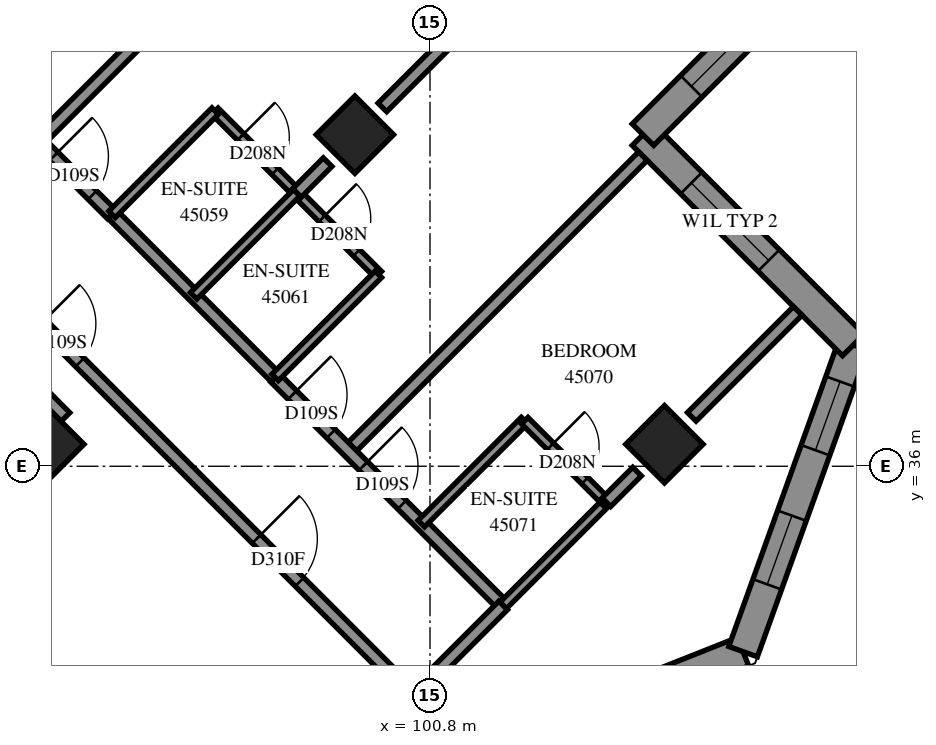
"""IFC4 building model, lengths in metres.
Left out: names, types, materials, properties, quantities, classifications, styles, units other than length and angle.
Written with IfcOpenShell. Run it as: python <this file> out.ifc"""

import sys

from ifc_helpers import new_model, si_unit, direction, frame, frame_2d, origin, origin_2d, place, context, subcontext, project, spatial, polyline, rectangle, outline, extrude, element, fill, save


model = new_model("IFC4")
c1 = context("Model", 3, precision=1e-05, world=origin(), true_north=direction((0.0, 1.0)))
c2 = subcontext(c1, "Body", "Model", "MODEL_VIEW")
j1 = project(units=[si_unit("LENGTHUNIT", "METRE"), si_unit("PLANEANGLEUNIT", "RADIAN")], contexts=[c1])
p1 = place(None, origin())
s1 = spatial("IfcSite", under=j1, at=p1, CompositionType="ELEMENT")
p2 = place(p1, origin())
s2 = spatial("IfcBuilding", under=s1, at=p2, CompositionType="ELEMENT")
p3 = place(p2, frame((0.0, 0.0, 166.0)))
s3 = spatial("IfcBuildingStorey", under=s2, at=p3, CompositionType="ELEMENT", Elevation=166.0)
for number, where, z_axis, x_axis in (
    (1, (99.565, 41.453, 0.0), (0.0, 0.0, 1.0), (0.707, -0.707, 0.0)),
    (2, (94.474, 36.362, 0.0), (0.0, 0.0, 1.0), (0.707, -0.707, 0.0)),
    (3, (104.656, 36.362, 0.0), (0.0, 0.0, 1.0), (0.707, -0.707, 0.0)),
):
    element("IfcColumn", number, at=place(p3, frame(where, z_axis=z_axis, x_axis=x_axis)), inside=s3, PredefinedType="COLUMN", context=c2, shape_type="SweptSolid", body=[
        extrude(rectangle(XDim=0.9, YDim=0.9, at=origin_2d()), origin(), (0.0, 0.0, 1.0), 3.1),
    ])
p4 = place(p3, frame((87.049, 38.695, -0.3), z_axis=(0.0, 0.0, 1.0), x_axis=(0.7071067812, 0.7071067812, 0.0)))
e4 = element("IfcWall", 4, at=p4, inside=s3, PredefinedType="SHEAR", context=c2, shape_type="SweptSolid", body=[
    extrude(rectangle(XDim=14.4, YDim=0.6, at=frame_2d((7.2, 0.0))), origin(), (0.0, 0.0, 1.0), 2.7),
])
p5 = place(p4, frame((4.55, 0.0, 0.3)))
e5 = element("IfcOpeningElement", 5, at=p5, cuts=e4, PredefinedType="OPENING", context=c2, shape_type="SweptSolid", body=[
    extrude(rectangle(XDim=1.1, YDim=2.1, at=frame_2d((0.55, 1.05))), frame((0.0, 0.31, 0.0), z_axis=(0.0, -1.0, 0.0), x_axis=(1.0, 0.0, 0.0)), (0.0, 0.0, 1.0), 0.62),
])
p6 = place(p4, frame((11.35, 0.0, 0.3)))
e6 = element("IfcOpeningElement", 6, at=p6, cuts=e4, PredefinedType="OPENING", context=c2, shape_type="SweptSolid", body=[
    extrude(rectangle(XDim=1.1, YDim=2.1, at=frame_2d((0.55, 1.05))), frame((0.0, 0.31, 0.0), z_axis=(0.0, -1.0, 0.0), x_axis=(1.0, 0.0, 0.0)), (0.0, 0.0, 1.0), 0.62),
])
p7 = place(p3, frame((100.796, 30.907, 0.0), z_axis=(0.0, 0.0, 1.0), x_axis=(0.9295366495, 0.3687297347, 0.0)))
e7 = element("IfcWall", 7, at=p7, inside=s3, PredefinedType="SOLIDWALL", context=c2, shape_type="SweptSolid", body=[
    extrude(outline(polyline([(0.108, -0.25), (5.656, -0.25), (5.43, 0.25), (-0.108, 0.25), (0.108, -0.25)])), origin(), (0.0, 0.0, 1.0), 3.1),
])
p8 = place(p7, frame((0.638, 0.0, 0.45)))
e8 = element("IfcOpeningElement", 8, at=p8, cuts=e7, PredefinedType="OPENING", context=c2, shape_type="SweptSolid", body=[
    extrude(rectangle(XDim=2.8, YDim=2.5, at=frame_2d((1.4, 1.25))), frame((0.0, 0.26, 0.0), z_axis=(0.0, -1.0, 0.0), x_axis=(1.0, 0.0, 0.0)), (0.0, 0.0, 1.0), 0.52),
])
p9 = place(p3, frame((105.949, 32.951, 0.0), z_axis=(0.0, 0.0, 1.0), x_axis=(0.3382165441, 0.9410683128, 0.0)))
e9 = element("IfcWall", 9, at=p9, inside=s3, PredefinedType="SOLIDWALL", context=c2, shape_type="SweptSolid", body=[
    extrude(outline(polyline([(-0.113, -0.25), (5.517, -0.25), (5.2, 0.25), (0.113, 0.25), (-0.113, -0.25)])), origin(), (0.0, 0.0, 1.0), 3.1),
])
p10 = place(p9, frame((1.176, 0.0, 0.45)))
e10 = element("IfcOpeningElement", 10, at=p10, cuts=e9, PredefinedType="OPENING", context=c2, shape_type="SweptSolid", body=[
    extrude(rectangle(XDim=1.2, YDim=2.5, at=frame_2d((0.6, 1.25))), frame((0.0, 0.26, 0.0), z_axis=(0.0, -1.0, 0.0), x_axis=(1.0, 0.0, 0.0)), (0.0, 0.0, 1.0), 0.52),
])
p11 = place(p9, frame((3.52, 0.0, 0.45)))
e11 = element("IfcOpeningElement", 11, at=p11, cuts=e9, PredefinedType="OPENING", context=c2, shape_type="SweptSolid", body=[
    extrude(rectangle(XDim=1.2, YDim=2.5, at=frame_2d((0.6, 1.25))), frame((0.0, 0.26, 0.0), z_axis=(0.0, -1.0, 0.0), x_axis=(1.0, 0.0, 0.0)), (0.0, 0.0, 1.0), 0.52),
])
p12 = place(p3, frame((107.761, 37.994, 0.0), z_axis=(0.0, 0.0, 1.0), x_axis=(-0.7071170028, 0.7070965594, 0.0)))
e12 = element("IfcWall", 12, at=p12, inside=s3, PredefinedType="SOLIDWALL", context=c2, shape_type="SweptSolid", body=[
    extrude(outline(polyline([(-0.159, -0.25), (4.641, -0.25), (5.141, 0.25), (0.159, 0.25), (-0.159, -0.25)])), origin(), (0.0, 0.0, 1.0), 3.1),
])
p13 = place(p12, frame((1.966, 0.0, 0.6)))
e13 = element("IfcOpeningElement", 13, at=p13, cuts=e12, PredefinedType="OPENING", context=c2, shape_type="SweptSolid", body=[
    extrude(rectangle(XDim=1.8, YDim=1.9, at=frame_2d((0.9, 0.95))), frame((0.0, 0.26, 0.0), z_axis=(0.0, -1.0, 0.0), x_axis=(1.0, 0.0, 0.0)), (0.0, 0.0, 1.0), 0.52),
])
p14 = place(p3, frame((104.302, 41.453, 0.0), z_axis=(0.0, 0.0, 1.0), x_axis=(0.7071238144, 0.7070897476, 0.0)))
e14 = element("IfcWall", 14, at=p14, inside=s3, PredefinedType="SOLIDWALL", context=c2, shape_type="SweptSolid", body=[
    extrude(outline(polyline([(0.25, -0.25), (6.222, -0.25), (5.52, 0.25), (-0.25, 0.25), (0.25, -0.25)])), origin(), (0.0, 0.0, 1.0), 3.1),
])
p15 = place(p14, frame((1.125, 0.0, 0.6)))
e15 = element("IfcOpeningElement", 15, at=p15, cuts=e14, PredefinedType="OPENING", context=c2, shape_type="SweptSolid", body=[
    extrude(rectangle(XDim=1.8, YDim=1.9, at=frame_2d((0.9, 0.95))), frame((0.0, 0.26, 0.0), z_axis=(0.0, -1.0, 0.0), x_axis=(1.0, 0.0, 0.0)), (0.0, 0.0, 1.0), 0.52),
])
p16 = place(p14, frame((3.985, 0.0, 0.6)))
e16 = element("IfcOpeningElement", 16, at=p16, cuts=e14, PredefinedType="OPENING", context=c2, shape_type="SweptSolid", body=[
    extrude(rectangle(XDim=1.2, YDim=1.9, at=frame_2d((0.6, 0.95))), frame((0.0, 0.26, 0.0), z_axis=(0.0, -1.0, 0.0), x_axis=(1.0, 0.0, 0.0)), (0.0, 0.0, 1.0), 0.52),
])
p17 = place(p3, frame((91.967, 40.785, 0.0), z_axis=(0.0, 0.0, 1.0), x_axis=(0.7071067812, -0.7071067812, 0.0)))
e17 = element("IfcWall", 17, at=p17, inside=s3, PredefinedType="PARTITIONING", context=c2, shape_type="SweptSolid", body=[
    extrude(rectangle(XDim=12.1, YDim=0.2, at=frame_2d((6.05, 0.0))), origin(), (0.0, 0.0, 1.0), 3.1),
])
p18 = place(p17, frame((3.448, 0.0, 0.0)))
e18 = element("IfcOpeningElement", 18, at=p18, cuts=e17, PredefinedType="OPENING", context=c2, shape_type="SweptSolid", body=[
    extrude(rectangle(XDim=0.9, YDim=2.1, at=frame_2d((0.45, 1.05))), frame((0.0, 0.11, 0.0), z_axis=(0.0, -1.0, 0.0), x_axis=(1.0, 0.0, 0.0)), (0.0, 0.0, 1.0), 0.22),
])
p19 = place(p17, frame((8.457, 0.0, 0.0)))
e19 = element("IfcOpeningElement", 19, at=p19, cuts=e17, PredefinedType="OPENING", context=c2, shape_type="SweptSolid", body=[
    extrude(rectangle(XDim=1.0, YDim=2.1, at=frame_2d((0.5, 1.05))), frame((0.0, 0.11, 0.0), z_axis=(0.0, -1.0, 0.0), x_axis=(1.0, 0.0, 0.0)), (0.0, 0.0, 1.0), 0.22),
])
p20 = place(p3, frame((94.366, 41.348, 0.0), z_axis=(0.0, 0.0, 1.0), x_axis=(0.7071108994, 0.707102663, 0.0)))
e20 = element("IfcWall", 20, at=p20, inside=s3, PredefinedType="PARTITIONING", context=c2, shape_type="SweptSolid", body=[
    extrude(rectangle(XDim=12.141, YDim=0.2, at=frame_2d((6.071, 0.0))), origin(), (0.0, 0.0, 1.0), 3.1),
])
p21 = place(p3, frame((93.306, 42.408, 0.0), z_axis=(0.0, 0.0, 1.0), x_axis=(0.7071067812, 0.7071067812, 0.0)))
e21 = element("IfcWall", 21, at=p21, inside=s3, PredefinedType="PARTITIONING", context=c2, shape_type="SweptSolid", body=[
    extrude(rectangle(XDim=9.45, YDim=0.2, at=frame_2d((4.725, 0.0))), origin(), (0.0, 0.0, 1.0), 3.1),
])
p22 = place(p21, frame((0.253, 0.0, 0.0)))
e22 = element("IfcOpeningElement", 22, at=p22, cuts=e21, PredefinedType="OPENING", context=c2, shape_type="SweptSolid", body=[
    extrude(rectangle(XDim=1.0, YDim=2.1, at=frame_2d((0.5, 1.05))), frame((0.0, 0.11, 0.0), z_axis=(0.0, -1.0, 0.0), x_axis=(1.0, 0.0, 0.0)), (0.0, 0.0, 1.0), 0.22),
])
p23 = place(p3, frame((99.458, 36.256, 0.0), z_axis=(0.0, 0.0, 1.0), x_axis=(0.7071067812, 0.7071067812, 0.0)))
e23 = element("IfcWall", 23, at=p23, inside=s3, PredefinedType="PARTITIONING", context=c2, shape_type="SweptSolid", body=[
    extrude(rectangle(XDim=6.85, YDim=0.2, at=frame_2d((3.425, 0.0))), origin(), (0.0, 0.0, 1.0), 3.1),
])
p24 = place(p3, frame((100.017, 41.901, 0.0), z_axis=(0.0, 0.0, 1.0), x_axis=(0.7072754814, 0.7069380408, 0.0)))
e24 = element("IfcWall", 24, at=p24, inside=s3, PredefinedType="PARTITIONING", context=c2, shape_type="SweptSolid", body=[
    extrude(rectangle(XDim=5.927, YDim=0.2, at=frame_2d((2.963, 0.0))), origin(), (0.0, 0.0, 1.0), 3.1),
])
p25 = place(p3, frame((98.253, 37.455, 0.0), z_axis=(0.0, 0.0, 1.0), x_axis=(0.7071067812, -0.7071067812, 0.0)))
e25 = element("IfcWall", 25, at=p25, inside=s3, PredefinedType="PARTITIONING", context=c2, shape_type="SweptSolid", body=[
    extrude(rectangle(XDim=5.301, YDim=0.2, at=frame_2d((2.65, 0.0))), origin(), (0.0, 0.0, 1.0), 3.1),
])
p26 = place(p25, frame((0.401, 0.0, 0.0)))
e26 = element("IfcOpeningElement", 26, at=p26, cuts=e25, PredefinedType="OPENING", context=c2, shape_type="SweptSolid", body=[
    extrude(rectangle(XDim=0.9, YDim=2.1, at=frame_2d((0.45, 1.05))), frame((0.0, 0.11, 0.0), z_axis=(0.0, -1.0, 0.0), x_axis=(1.0, 0.0, 0.0)), (0.0, 0.0, 1.0), 0.22),
])
p27 = place(p25, frame((2.05, 0.0, 0.0)))
e27 = element("IfcOpeningElement", 27, at=p27, cuts=e25, PredefinedType="OPENING", context=c2, shape_type="SweptSolid", body=[
    extrude(rectangle(XDim=0.9, YDim=2.1, at=frame_2d((0.45, 1.05))), frame((0.0, 0.11, 0.0), z_axis=(0.0, -1.0, 0.0), x_axis=(1.0, 0.0, 0.0)), (0.0, 0.0, 1.0), 0.22),
])
p28 = place(p3, frame((97.263, 41.839, 0.0), z_axis=(0.0, 0.0, 1.0), x_axis=(0.7071067812, -0.7071067812, 0.0)))
e28 = element("IfcWall", 28, at=p28, inside=s3, PredefinedType="PARTITIONING", context=c2, shape_type="SweptSolid", body=[
    extrude(rectangle(XDim=3.801, YDim=0.15, at=frame_2d((1.901, 0.0))), origin(), (0.0, 0.0, 1.0), 3.1),
])
p29 = place(p28, frame((0.598, 0.0, 0.0)))
e29 = element("IfcOpeningElement", 29, at=p29, cuts=e28, PredefinedType="OPENING", context=c2, shape_type="SweptSolid", body=[
    extrude(rectangle(XDim=0.8, YDim=2.1, at=frame_2d((0.4, 1.05))), frame((0.0, 0.085, 0.0), z_axis=(0.0, -1.0, 0.0), x_axis=(1.0, 0.0, 0.0)), (0.0, 0.0, 1.0), 0.17),
])
p30 = place(p28, frame((2.493, 0.0, 0.0)))
e30 = element("IfcOpeningElement", 30, at=p30, cuts=e28, PredefinedType="OPENING", context=c2, shape_type="SweptSolid", body=[
    extrude(rectangle(XDim=0.8, YDim=2.1, at=frame_2d((0.4, 1.05))), frame((0.0, 0.085, 0.0), z_axis=(0.0, -1.0, 0.0), x_axis=(1.0, 0.0, 0.0)), (0.0, 0.0, 1.0), 0.17),
])
p31 = place(p3, frame((95.573, 40.148, 0.0), z_axis=(0.0, 0.0, 1.0), x_axis=(0.7068698107, -0.7073436723, 0.0)))
e31 = element("IfcWall", 31, at=p31, inside=s3, PredefinedType="PARTITIONING", context=c2, shape_type="SweptSolid", body=[
    extrude(rectangle(XDim=3.799, YDim=0.2, at=frame_2d((1.899, 0.0))), origin(), (0.0, 0.0, 1.0), 3.1),
])
p32 = place(p3, frame((93.305, 42.403, 0.0), z_axis=(0.0, 0.0, 1.0), x_axis=(0.7071067812, -0.7071067812, 0.0)))
e32 = element("IfcWall", 32, at=p32, inside=s3, PredefinedType="PARTITIONING", context=c2, shape_type="SweptSolid", body=[
    extrude(rectangle(XDim=3.199, YDim=0.2, at=frame_2d((1.599, 0.0))), origin(), (0.0, 0.0, 1.0), 3.1),
])
p33 = place(p32, frame((1.848, 0.0, 0.0)))
e33 = element("IfcOpeningElement", 33, at=p33, cuts=e32, PredefinedType="OPENING", context=c2, shape_type="SweptSolid", body=[
    extrude(rectangle(XDim=0.9, YDim=2.1, at=frame_2d((0.45, 1.05))), frame((0.0, 0.11, 0.0), z_axis=(0.0, -1.0, 0.0), x_axis=(1.0, 0.0, 0.0)), (0.0, 0.0, 1.0), 0.22),
])
p34 = place(p3, frame((105.105, 36.813, 0.0), z_axis=(0.0, 0.0, 1.0), x_axis=(0.7071067812, 0.7071067812, 0.0)))
e34 = element("IfcWall", 34, at=p34, inside=s3, PredefinedType="PARTITIONING", context=c2, shape_type="SweptSolid", body=[
    extrude(rectangle(XDim=2.463, YDim=0.2, at=frame_2d((1.232, 0.0))), origin(), (0.0, 0.0, 1.0), 3.1),
])
p35 = place(p3, frame((102.003, 33.711, 0.0), z_axis=(0.0, 0.0, 1.0), x_axis=(0.7071067812, 0.7071067812, 0.0)))
e35 = element("IfcWall", 35, at=p35, inside=s3, PredefinedType="PARTITIONING", context=c2, shape_type="SweptSolid", body=[
    extrude(rectangle(XDim=2.401, YDim=0.15, at=frame_2d((1.201, 0.0))), origin(), (0.0, 0.0, 1.0), 2.6),
])
for number, where, z_axis, x_axis in (
    (36, (95.571, 40.143, 0.0), (0.0, 0.0, 1.0), (0.707, 0.708, 0.0)),
    (37, (98.253, 37.461, 0.0), (0.0, 0.0, 1.0), (0.708, 0.707, 0.0)),
    (38, (100.657, 35.057, 0.0), (0.0, 0.0, 1.0), (0.708, 0.707, 0.0)),
):
    element("IfcWall", number, at=place(p3, frame(where, z_axis=z_axis, x_axis=x_axis)), inside=s3, PredefinedType="PARTITIONING", context=c2, shape_type="SweptSolid", body=[
        extrude(rectangle(XDim=2.4, YDim=0.15, at=frame_2d((1.2, 0.0))), origin(), (0.0, 0.0, 1.0), 3.1),
    ])
p36 = place(p3, frame((96.913, 38.803, 0.0), z_axis=(0.0, 0.0, 1.0), x_axis=(0.7071067812, 0.7071067812, 0.0)))
e39 = element("IfcWall", 39, at=p36, inside=s3, PredefinedType="PARTITIONING", context=c2, shape_type="SweptSolid", body=[
    extrude(rectangle(XDim=2.398, YDim=0.15, at=frame_2d((1.199, 0.0))), origin(), (0.0, 0.0, 1.0), 3.1),
])
p37 = place(p3, frame((100.519, 32.227, 0.0), z_axis=(0.0, 0.0, 1.0), x_axis=(0.7071067812, 0.7071067812, 0.0)))
e40 = element("IfcWall", 40, at=p37, inside=s3, PredefinedType="PARTITIONING", context=c2, shape_type="SweptSolid", body=[
    extrude(rectangle(XDim=2.099, YDim=0.2, at=frame_2d((1.049, 0.0))), origin(), (0.0, 0.0, 1.0), 2.6),
])
p38 = place(p3, frame((102.358, 36.75, 0.0), z_axis=(0.0, 0.0, 1.0), x_axis=(0.7076330979, -0.7065800724, 0.0)))
e41 = element("IfcWall", 41, at=p38, inside=s3, PredefinedType="PARTITIONING", context=c2, shape_type="SweptSolid", body=[
    extrude(rectangle(XDim=1.899, YDim=0.15, at=frame_2d((0.95, 0.0))), origin(), (0.0, 0.0, 1.0), 3.1),
])
p39 = place(p38, frame((0.597, 0.0, 0.0)))
e42 = element("IfcOpeningElement", 42, at=p39, cuts=e41, PredefinedType="OPENING", context=c2, shape_type="SweptSolid", body=[
    extrude(rectangle(XDim=0.8, YDim=2.1, at=frame_2d((0.4, 1.05))), frame((0.0, 0.085, 0.0), z_axis=(0.0, -1.0, 0.0), x_axis=(1.0, 0.0, 0.0)), (0.0, 0.0, 1.0), 0.17),
])
p40 = place(p3, frame((98.613, 40.495, 0.0), z_axis=(0.0, 0.0, 1.0), x_axis=(0.7057051861, 0.7085056035, 0.0)))
e43 = element("IfcWall", 43, at=p40, inside=s3, PredefinedType="PARTITIONING", context=c2, shape_type="SweptSolid", body=[
    extrude(rectangle(XDim=0.714, YDim=0.2, at=frame_2d((0.357, 0.0))), origin(), (0.0, 0.0, 1.0), 3.1),
])
p41 = place(p3, frame((103.701, 35.409, 0.0), z_axis=(0.0, 0.0, 1.0), x_axis=(0.7071067812, 0.7071067812, 0.0)))
e44 = element("IfcWall", 44, at=p41, inside=s3, PredefinedType="PARTITIONING", context=c2, shape_type="SweptSolid", body=[
    extrude(rectangle(XDim=0.713, YDim=0.2, at=frame_2d((0.356, 0.0))), origin(), (0.0, 0.0, 1.0), 2.6),
])
p42 = place(p3, frame((94.476, 37.142, 0.0), z_axis=(0.0, 0.0, 1.0), x_axis=(0.7049672897, -0.7092398187, 0.0)))
e45 = element("IfcWall", 45, at=p42, inside=s3, PredefinedType="PARTITIONING", context=c2, shape_type="SweptSolid", body=[
    extrude(rectangle(XDim=0.468, YDim=0.2, at=frame_2d((0.234, 0.0))), origin(), (0.0, 0.0, 1.0), 3.1),
])
p43 = place(p10, origin())
e46 = element("IfcWindow", 46, at=p43, inside=s3, PartitioningType="SINGLE_PANEL", PredefinedType="WINDOW", context=c2, shape_type="SweptSolid", body=[
    extrude(rectangle(XDim=1.2, YDim=2.5, at=frame_2d((0.6, 1.25))), frame((0.0, 0.18, 0.0), z_axis=(0.0, -1.0, 0.0), x_axis=(1.0, 0.0, 0.0)), (0.0, 0.0, 1.0), 0.06),
])
fill(e10, e46)
p44 = place(p11, origin())
e47 = element("IfcWindow", 47, at=p44, inside=s3, PartitioningType="SINGLE_PANEL", PredefinedType="WINDOW", context=c2, shape_type="SweptSolid", body=[
    extrude(rectangle(XDim=1.2, YDim=2.5, at=frame_2d((0.6, 1.25))), frame((0.0, 0.18, 0.0), z_axis=(0.0, -1.0, 0.0), x_axis=(1.0, 0.0, 0.0)), (0.0, 0.0, 1.0), 0.06),
])
fill(e11, e47)
p45 = place(p13, origin())
e48 = element("IfcWindow", 48, at=p45, inside=s3, PartitioningType="SINGLE_PANEL", PredefinedType="WINDOW", context=c2, shape_type="SweptSolid", body=[
    extrude(rectangle(XDim=1.8, YDim=1.9, at=frame_2d((0.9, 0.95))), frame((0.0, 0.18, 0.0), z_axis=(0.0, -1.0, 0.0), x_axis=(1.0, 0.0, 0.0)), (0.0, 0.0, 1.0), 0.06),
])
fill(e13, e48)
p46 = place(p15, origin())
e49 = element("IfcWindow", 49, at=p46, inside=s3, PartitioningType="SINGLE_PANEL", PredefinedType="WINDOW", context=c2, shape_type="SweptSolid", body=[
    extrude(rectangle(XDim=1.8, YDim=1.9, at=frame_2d((0.9, 0.95))), frame((0.0, 0.18, 0.0), z_axis=(0.0, -1.0, 0.0), x_axis=(1.0, 0.0, 0.0)), (0.0, 0.0, 1.0), 0.06),
])
fill(e15, e49)
p47 = place(p33, origin())
e50 = element("IfcDoor", 50, at=p47, inside=s3, OperationType="SINGLE_SWING_RIGHT", PredefinedType="DOOR", context=c2, shape_type="SweptSolid", body=[
    extrude(rectangle(XDim=0.9, YDim=2.1, at=frame_2d((0.45, 1.05))), frame((0.0, 0.025, 0.0), z_axis=(0.0, -1.0, 0.0), x_axis=(1.0, 0.0, 0.0)), (0.0, 0.0, 1.0), 0.05),
])
fill(e33, e50)
p48 = place(p29, origin())
e51 = element("IfcDoor", 51, at=p48, inside=s3, OperationType="SINGLE_SWING_RIGHT", PredefinedType="DOOR", context=c2, shape_type="SweptSolid", body=[
    extrude(rectangle(XDim=0.8, YDim=2.1, at=frame_2d((0.4, 1.05))), frame((0.0, 0.025, 0.0), z_axis=(0.0, -1.0, 0.0), x_axis=(1.0, 0.0, 0.0)), (0.0, 0.0, 1.0), 0.05),
])
fill(e29, e51)
p49 = place(p26, origin())
e52 = element("IfcDoor", 52, at=p49, inside=s3, OperationType="SINGLE_SWING_LEFT", PredefinedType="DOOR", context=c2, shape_type="SweptSolid", body=[
    extrude(rectangle(XDim=0.9, YDim=2.1, at=frame_2d((0.45, 1.05))), frame((0.0, 0.025, 0.0), z_axis=(0.0, -1.0, 0.0), x_axis=(1.0, 0.0, 0.0)), (0.0, 0.0, 1.0), 0.05),
])
fill(e26, e52)
p50 = place(p30, origin())
e53 = element("IfcDoor", 53, at=p50, inside=s3, OperationType="SINGLE_SWING_RIGHT", PredefinedType="DOOR", context=c2, shape_type="SweptSolid", body=[
    extrude(rectangle(XDim=0.8, YDim=2.1, at=frame_2d((0.4, 1.05))), frame((0.0, 0.025, 0.0), z_axis=(0.0, -1.0, 0.0), x_axis=(1.0, 0.0, 0.0)), (0.0, 0.0, 1.0), 0.05),
])
fill(e30, e53)
p51 = place(p18, origin())
e54 = element("IfcDoor", 54, at=p51, inside=s3, OperationType="SINGLE_SWING_LEFT", PredefinedType="DOOR", context=c2, shape_type="SweptSolid", body=[
    extrude(rectangle(XDim=0.9, YDim=2.1, at=frame_2d((0.45, 1.05))), frame((0.0, 0.025, 0.0), z_axis=(0.0, -1.0, 0.0), x_axis=(1.0, 0.0, 0.0)), (0.0, 0.0, 1.0), 0.05),
])
fill(e18, e54)
p52 = place(p19, origin())
e55 = element("IfcDoor", 55, at=p52, inside=s3, OperationType="SINGLE_SWING_RIGHT", PredefinedType="DOOR", context=c2, shape_type="SweptSolid", body=[
    extrude(rectangle(XDim=1.0, YDim=2.1, at=frame_2d((0.5, 1.05))), frame((0.0, 0.025, 0.0), z_axis=(0.0, -1.0, 0.0), x_axis=(1.0, 0.0, 0.0)), (0.0, 0.0, 1.0), 0.05),
])
fill(e19, e55)
p53 = place(p27, origin())
e56 = element("IfcDoor", 56, at=p53, inside=s3, OperationType="SINGLE_SWING_RIGHT", PredefinedType="DOOR", context=c2, shape_type="SweptSolid", body=[
    extrude(rectangle(XDim=0.9, YDim=2.1, at=frame_2d((0.45, 1.05))), frame((0.0, 0.025, 0.0), z_axis=(0.0, -1.0, 0.0), x_axis=(1.0, 0.0, 0.0)), (0.0, 0.0, 1.0), 0.05),
])
fill(e27, e56)
p54 = place(p39, origin())
e57 = element("IfcDoor", 57, at=p54, inside=s3, OperationType="SINGLE_SWING_RIGHT", PredefinedType="DOOR", context=c2, shape_type="SweptSolid", body=[
    extrude(rectangle(XDim=0.8, YDim=2.1, at=frame_2d((0.4, 1.05))), frame((0.0, 0.025, 0.0), z_axis=(0.0, -1.0, 0.0), x_axis=(1.0, 0.0, 0.0)), (0.0, 0.0, 1.0), 0.05),
])
fill(e42, e57)
save(model, sys.argv[1])
